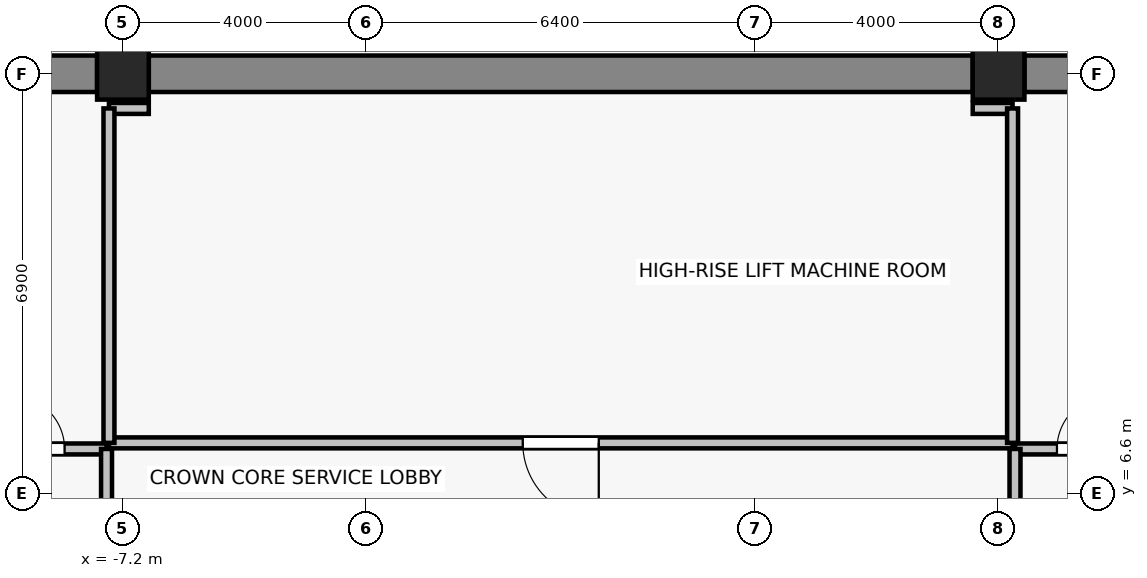
"""IFC4 building model, lengths in metres.
Left out: names, types, materials, properties, quantities, classifications, styles, units other than length and angle.
Written with IfcOpenShell. Run it as: python <this file> out.ifc"""

import sys

from ifc_helpers import new_model, si_unit, direction, frame, frame_2d, origin, origin_2d, place, context, subcontext, project, spatial, rectangle, extrude, source, transform, mapped, element, fill, save


model = new_model("IFC4")
c1 = context("Model", 3, precision=1e-05, world=origin(), true_north=direction((0.0, 1.0)))
c2 = subcontext(c1, "Body", "Model", "MODEL_VIEW")
j1 = project(units=[si_unit("LENGTHUNIT", "METRE"), si_unit("PLANEANGLEUNIT", "RADIAN")], contexts=[c1])
p1 = place(None, origin())
s1 = spatial("IfcSite", under=j1, at=p1, CompositionType="ELEMENT")
p2 = place(p1, origin())
s2 = spatial("IfcBuilding", under=s1, at=p2, CompositionType="ELEMENT")
p3 = place(p2, frame((0.0, 0.0, 294.6)))
s3 = spatial("IfcBuildingStorey", under=s2, at=p3, CompositionType="ELEMENT", Elevation=294.6)
for number, where, z_axis, x_axis in (
    (1, (-7.2, 13.5, 0.0), (0.0, 0.0, 1.0), (1.0, 0.0, 0.0)),
    (2, (7.2, 13.5, 0.0), (0.0, 0.0, 1.0), (1.0, 0.0, 0.0)),
):
    element("IfcColumn", number, at=place(p3, frame(where, z_axis=z_axis, x_axis=x_axis)), inside=s3, PredefinedType="COLUMN", context=c2, shape_type="SweptSolid", body=[
        extrude(rectangle(XDim=0.85, YDim=0.85, at=origin_2d()), origin(), (0.0, 0.0, 1.0), 4.6),
    ])
p4 = place(p3, frame((-13.975, 13.5, 0.0), z_axis=(0.0, 0.0, 1.0), x_axis=(1.0, 0.0, 0.0)))
e3 = element("IfcWall", 3, at=p4, inside=s3, PredefinedType="SHEAR", context=c2, shape_type="SweptSolid", body=[
    extrude(rectangle(XDim=6.35, YDim=0.6, at=frame_2d((3.175, 0.0))), origin(), (0.0, 0.0, 1.0), 4.38),
])
p5 = place(p3, frame((-6.775, 13.5, 0.0), z_axis=(0.0, 0.0, 1.0), x_axis=(1.0, 0.0, 0.0)))
e4 = element("IfcWall", 4, at=p5, inside=s3, PredefinedType="SHEAR", context=c2, shape_type="SweptSolid", body=[
    extrude(rectangle(XDim=13.55, YDim=0.6, at=frame_2d((6.775, 0.0))), origin(), (0.0, 0.0, 1.0), 4.38),
])
p6 = place(p3, frame((7.625, 13.5, 0.0), z_axis=(0.0, 0.0, 1.0), x_axis=(1.0, 0.0, 0.0)))
e5 = element("IfcWall", 5, at=p6, inside=s3, PredefinedType="SHEAR", context=c2, shape_type="SweptSolid", body=[
    extrude(rectangle(XDim=6.35, YDim=0.6, at=frame_2d((3.175, 0.0))), origin(), (0.0, 0.0, 1.0), 4.38),
])
p7 = place(p3, frame((7.43, 7.43, 0.0), z_axis=(0.0, 0.0, 1.0), x_axis=(-1.0, 0.0, 0.0)))
e6 = element("IfcWall", 6, at=p7, inside=s3, PredefinedType="PARTITIONING", context=c2, shape_type="SweptSolid", body=[
    extrude(rectangle(XDim=14.86, YDim=0.18, at=frame_2d((7.43, 0.0))), origin(), (0.0, 0.0, 1.0), 3.77),
])
p8 = place(p7, frame((6.805, 0.0, 0.0)))
e7 = element("IfcOpeningElement", 7, at=p8, cuts=e6, PredefinedType="OPENING", context=c2, shape_type="SweptSolid", body=[
    extrude(rectangle(XDim=1.25, YDim=2.15, at=frame_2d((0.625, 1.075))), frame((0.0, 0.1, 0.0), z_axis=(0.0, -1.0, 0.0), x_axis=(1.0, 0.0, 0.0)), (0.0, 0.0, 1.0), 0.2),
])
for number, where, z_axis, x_axis in (
    (8, (-7.43, 12.93, 0.0), (0.0, 0.0, 1.0), (1.0, 0.0, 0.0)),
    (9, (6.775, 12.93, 0.0), (0.0, 0.0, 1.0), (1.0, 0.0, 0.0)),
):
    element("IfcWall", number, at=place(p3, frame(where, z_axis=z_axis, x_axis=x_axis)), inside=s3, PredefinedType="PARTITIONING", context=c2, shape_type="SweptSolid", body=[
        extrude(rectangle(XDim=0.655, YDim=0.18, at=frame_2d((0.328, 0.0))), origin(), (0.0, 0.0, 1.0), 3.77),
    ])
for number, where, z_axis, x_axis in (
    (10, (-7.43, 7.43, 0.0), (0.0, 0.0, 1.0), (0.0, 1.0, 0.0)),
    (11, (7.43, 12.93, 0.0), (0.0, 0.0, 1.0), (0.0, -1.0, 0.0)),
):
    element("IfcWall", number, at=place(p3, frame(where, z_axis=z_axis, x_axis=x_axis)), inside=s3, PredefinedType="PARTITIONING", context=c2, shape_type="SweptSolid", body=[
        extrude(rectangle(XDim=5.5, YDim=0.18, at=frame_2d((2.75, 0.0))), origin(), (0.0, 0.0, 1.0), 3.77),
    ])
p9 = place(p3, frame((-9.73, 7.33, 0.0), z_axis=(0.0, 0.0, 1.0), x_axis=(1.0, 0.0, 0.0)))
e12 = element("IfcWall", 12, at=p9, inside=s3, PredefinedType="PARTITIONING", context=c2, shape_type="SweptSolid", body=[
    extrude(rectangle(XDim=2.26, YDim=0.18, at=frame_2d((1.13, 0.0))), origin(), (0.0, 0.0, 1.0), 3.77),
])
p10 = place(p9, frame((0.69, 0.0, 0.0)))
e13 = element("IfcOpeningElement", 13, at=p10, cuts=e12, PredefinedType="OPENING", context=c2, shape_type="SweptSolid", body=[
    extrude(rectangle(XDim=0.88, YDim=2.1, at=frame_2d((0.44, 1.05))), frame((0.0, 0.1, 0.0), z_axis=(0.0, -1.0, 0.0), x_axis=(1.0, 0.0, 0.0)), (0.0, 0.0, 1.0), 0.2),
])
p11 = place(p3, frame((-7.47, 7.33, 0.0), z_axis=(0.0, 0.0, 1.0), x_axis=(0.0, -1.0, 0.0)))
e14 = element("IfcWall", 14, at=p11, inside=s3, PredefinedType="PARTITIONING", context=c2, shape_type="SweptSolid", body=[
    extrude(rectangle(XDim=1.09, YDim=0.18, at=frame_2d((0.545, 0.0))), origin(), (0.0, 0.0, 1.0), 3.77),
])
p12 = place(p3, frame((7.47, 7.33, 0.0), z_axis=(0.0, 0.0, 1.0), x_axis=(1.0, 0.0, 0.0)))
e15 = element("IfcWall", 15, at=p12, inside=s3, PredefinedType="PARTITIONING", context=c2, shape_type="SweptSolid", body=[
    extrude(rectangle(XDim=2.26, YDim=0.18, at=frame_2d((1.13, 0.0))), origin(), (0.0, 0.0, 1.0), 3.77),
])
p13 = place(p12, frame((0.69, 0.0, 0.0)))
e16 = element("IfcOpeningElement", 16, at=p13, cuts=e15, PredefinedType="OPENING", context=c2, shape_type="SweptSolid", body=[
    extrude(rectangle(XDim=0.88, YDim=2.1, at=frame_2d((0.44, 1.05))), frame((0.0, 0.1, 0.0), z_axis=(0.0, -1.0, 0.0), x_axis=(1.0, 0.0, 0.0)), (0.0, 0.0, 1.0), 0.2),
])
p14 = place(p3, frame((7.47, 6.24, 0.0), z_axis=(0.0, 0.0, 1.0), x_axis=(0.0, 1.0, 0.0)))
e17 = element("IfcWall", 17, at=p14, inside=s3, PredefinedType="PARTITIONING", context=c2, shape_type="SweptSolid", body=[
    extrude(rectangle(XDim=1.09, YDim=0.18, at=frame_2d((0.545, 0.0))), origin(), (0.0, 0.0, 1.0), 3.77),
])
m1 = source(origin(), c2, "Body", "SweptSolid", [
    extrude(rectangle(XDim=1.25, YDim=2.15, at=frame_2d((0.625, 1.075))), frame((0.0, 0.025, 0.0), z_axis=(0.0, -1.0, 0.0), x_axis=(1.0, 0.0, 0.0)), (0.0, 0.0, 1.0), 0.05),
])
p15 = place(p8, origin())
e18 = element("IfcDoor", 18, at=p15, inside=s3, OperationType="SINGLE_SWING_LEFT", PredefinedType="DOOR", context=c2, shape_type="MappedRepresentation", body=[
    mapped(m1, transform((0.0, 0.0, 0.0), x_axis=(1.0, 0.0, 0.0), y_axis=(0.0, 1.0, 0.0), z_axis=(0.0, 0.0, 1.0), scale=1.0)),
])
fill(e7, e18)
m2 = source(origin(), c2, "Body", "SweptSolid", [
    extrude(rectangle(XDim=0.88, YDim=2.1, at=frame_2d((0.44, 1.05))), frame((0.0, 0.025, 0.0), z_axis=(0.0, -1.0, 0.0), x_axis=(1.0, 0.0, 0.0)), (0.0, 0.0, 1.0), 0.05),
])
p16 = place(p10, origin())
e19 = element("IfcDoor", 19, at=p16, inside=s3, OperationType="SINGLE_SWING_LEFT", PredefinedType="DOOR", context=c2, shape_type="MappedRepresentation", body=[
    mapped(m2, transform((0.0, 0.0, 0.0), x_axis=(1.0, 0.0, 0.0), y_axis=(0.0, 1.0, 0.0), z_axis=(0.0, 0.0, 1.0), scale=1.0)),
])
fill(e13, e19)
p17 = place(p13, origin())
e20 = element("IfcDoor", 20, at=p17, inside=s3, OperationType="SINGLE_SWING_RIGHT", PredefinedType="DOOR", context=c2, shape_type="MappedRepresentation", body=[
    mapped(m2, transform((0.0, 0.0, 0.0), x_axis=(1.0, 0.0, 0.0), y_axis=(0.0, 1.0, 0.0), z_axis=(0.0, 0.0, 1.0), scale=1.0)),
])
fill(e16, e20)
save(model, sys.argv[1])
